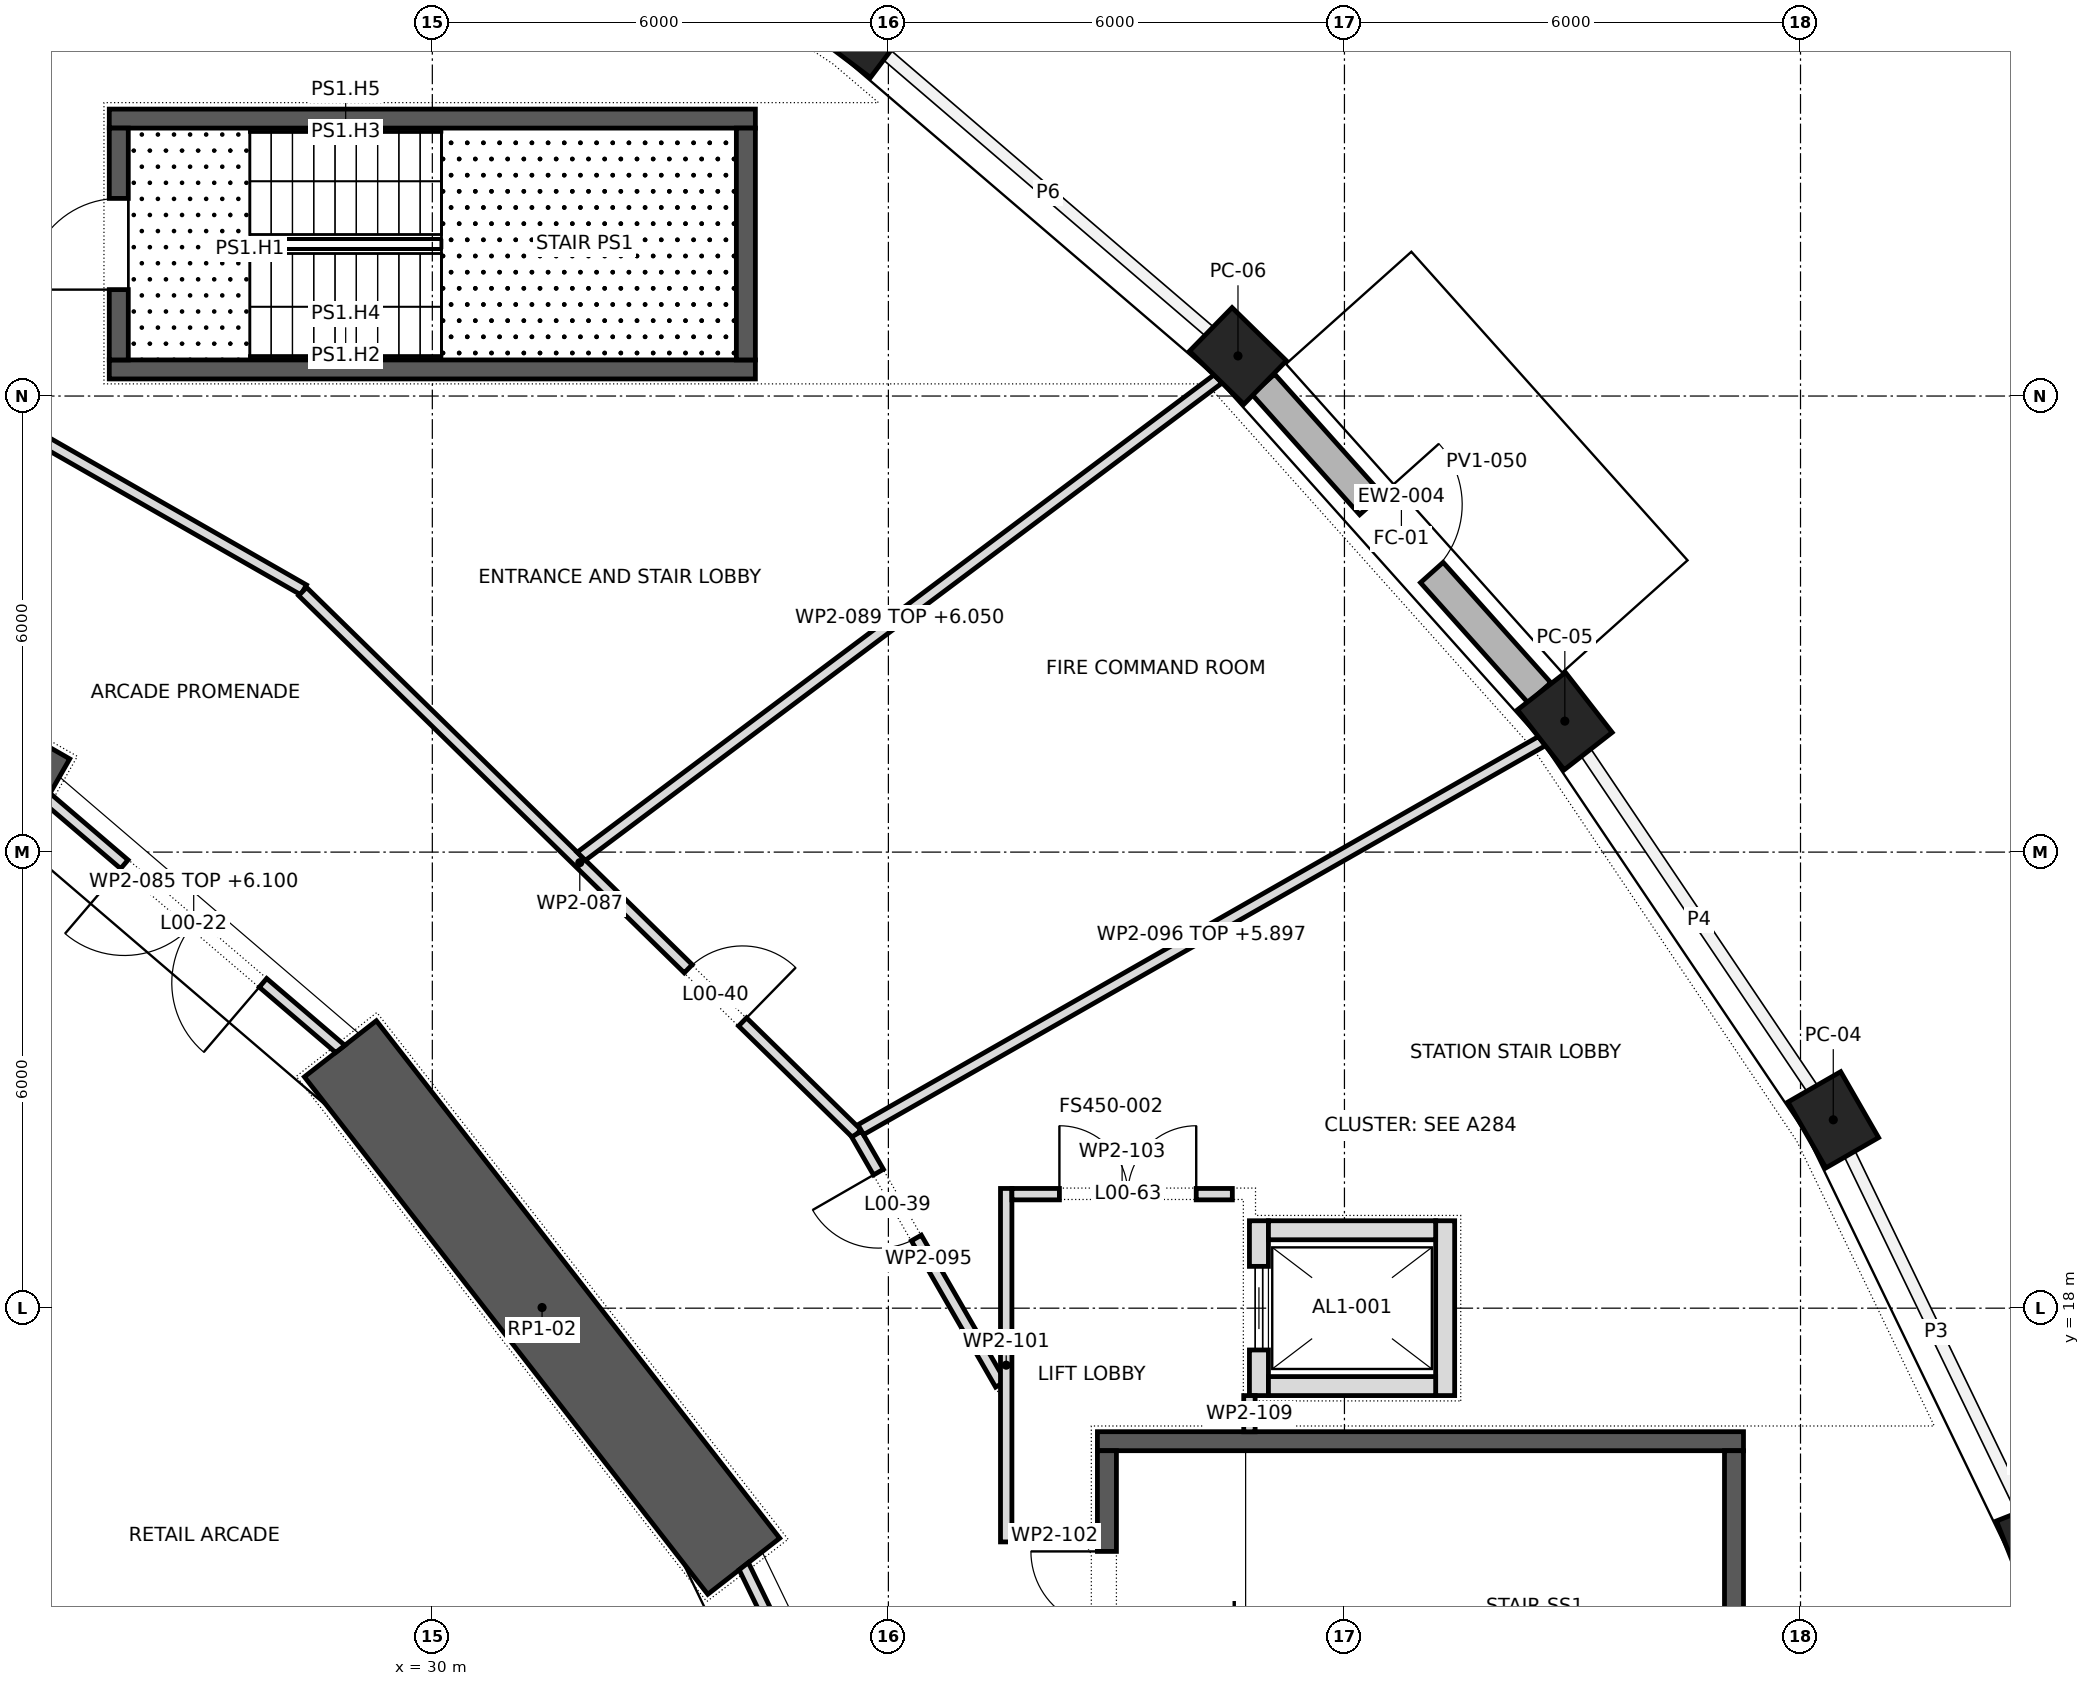
"""IFC4 building model, lengths in metres.
Left out: names, types, materials, properties, quantities, classifications, styles, units other than length and angle.
Written with IfcOpenShell. Run it as: python <this file> out.ifc"""

import sys

from ifc_helpers import new_model, si_unit, direction, frame, frame_2d, origin, origin_2d, place, context, subcontext, project, spatial, polyline, rectangle, outline, extrude, element, fill, save


model = new_model("IFC4")
c1 = context("Model", 3, precision=1e-05, world=origin(), true_north=direction((0.0, 1.0)))
c2 = subcontext(c1, "Body", "Model", "MODEL_VIEW")
j1 = project(units=[si_unit("LENGTHUNIT", "METRE"), si_unit("PLANEANGLEUNIT", "RADIAN")], contexts=[c1])
p1 = place(None, origin())
s1 = spatial("IfcSite", under=j1, at=p1, CompositionType="ELEMENT")
p2 = place(p1, origin())
s2 = spatial("IfcBuilding", under=s1, at=p2, CompositionType="ELEMENT")
p3 = place(p2, origin())
s3 = spatial("IfcBuildingStorey", under=s2, at=p3, CompositionType="ELEMENT", Elevation=0.0)
for number, where, z_axis, x_axis in (
    (1, (51.134, 14.883, 0.0), (0.0, 0.0, 1.0), (-0.368, 0.93, 0.0)),
    (2, (48.431, 20.478, 0.0), (0.0, 0.0, 1.0), (-0.499, 0.867, 0.0)),
    (3, (44.899, 25.723, 0.0), (0.0, 0.0, 1.0), (-0.615, 0.789, 0.0)),
    (4, (40.599, 30.528, 0.0), (0.0, 0.0, 1.0), (-0.715, 0.699, 0.0)),
    (5, (35.605, 34.81, 0.0), (0.0, 0.0, 1.0), (-0.799, 0.601, 0.0)),
):
    element("IfcColumn", number, at=place(p3, frame(where, z_axis=z_axis, x_axis=x_axis)), inside=s3, PredefinedType="COLUMN", context=c2, shape_type="SweptSolid", body=[
        extrude(rectangle(XDim=1.0, YDim=0.8, at=origin_2d()), origin(), (0.0, 0.0, 1.0), 7.0),
    ])
p4 = place(p3, frame((34.097, 14.605, 0.0), z_axis=(0.0, 0.0, 1.0), x_axis=(-0.614825322247, 0.788663314174, 0.0)))
e6 = element("IfcWall", 6, at=p4, inside=s3, PredefinedType="SHEAR", context=c2, shape_type="SweptSolid", body=[
    extrude(rectangle(XDim=8.632, YDim=1.2, at=frame_2d((4.316, 0.0))), origin(), (0.0, 0.0, 1.0), 7.0),
])
p5 = place(p3, frame((24.931, 24.706, 0.0), z_axis=(0.0, 0.0, 1.0), x_axis=(-0.867760656864, 0.496982336103, 0.0)))
e7 = element("IfcWall", 7, at=p5, inside=s3, PredefinedType="SHEAR", context=c2, shape_type="SweptSolid", body=[
    extrude(rectangle(XDim=9.038, YDim=1.2, at=frame_2d((4.519, 0.0))), origin(), (0.0, 0.0, 1.0), 7.0),
])
p6 = place(p3, frame((44.566, 26.095, 0.0), z_axis=(0.0, 0.0, 1.0), x_axis=(-0.666902265084, 0.745145199827, 0.0)))
e8 = element("IfcWall", 8, at=p6, inside=s3, PredefinedType="STANDARD", context=c2, shape_type="SweptSolid", body=[
    extrude(rectangle(XDim=5.448, YDim=0.4, at=frame_2d((2.724, 0.0))), origin(), (0.0, 0.0, 1.0), 6.2),
])
p7 = place(p6, frame((2.124, 0.0, 0.0)))
e9 = element("IfcOpeningElement", 9, at=p7, cuts=e8, PredefinedType="OPENING", context=c2, shape_type="SweptSolid", body=[
    extrude(rectangle(XDim=1.2, YDim=2.4, at=frame_2d((0.6, 1.2))), frame((0.0, 0.212, 0.0), z_axis=(0.0, -1.0, 0.0), x_axis=(1.0, 0.0, 0.0)), (0.0, 0.0, 1.0), 0.424),
])
p8 = place(p3, frame((38.75, 16.25, 0.0), z_axis=(0.0, 0.0, 1.0), x_axis=(1.0, 0.0, 0.0)))
e10 = element("IfcWall", 10, at=p8, inside=s3, PredefinedType="SHEAR", context=c2, shape_type="SweptSolid", body=[
    extrude(rectangle(XDim=8.5, YDim=0.25, at=frame_2d((4.25, 0.0))), origin(), (0.0, 0.0, 1.0), 6.65),
])
p9 = place(p3, frame((38.875, 11.875, 0.0), z_axis=(0.0, 0.0, 1.0), x_axis=(0.0, 1.0, 0.0)))
e11 = element("IfcWall", 11, at=p9, inside=s3, PredefinedType="SHEAR", context=c2, shape_type="SweptSolid", body=[
    extrude(rectangle(XDim=4.25, YDim=0.25, at=frame_2d((2.125, 0.0))), origin(), (0.0, 0.0, 1.0), 6.65),
])
p10 = place(p9, frame((0.925, 0.0, 0.0)))
e12 = element("IfcOpeningElement", 12, at=p10, cuts=e11, PredefinedType="OPENING", context=c2, shape_type="SweptSolid", body=[
    extrude(rectangle(XDim=2.0, YDim=2.1, at=frame_2d((1.0, 1.05))), frame((0.0, 0.137, 0.0), z_axis=(0.0, -1.0, 0.0), x_axis=(1.0, 0.0, 0.0)), (0.0, 0.0, 1.0), 0.274),
])
p11 = place(p3, frame((47.125, 11.875, 0.0), z_axis=(0.0, 0.0, 1.0), x_axis=(0.0, 1.0, 0.0)))
e13 = element("IfcWall", 13, at=p11, inside=s3, PredefinedType="SHEAR", context=c2, shape_type="SweptSolid", body=[
    extrude(rectangle(XDim=4.25, YDim=0.25, at=frame_2d((2.125, 0.0))), origin(), (0.0, 0.0, 1.0), 6.65),
])
for number, where, z_axis, x_axis in (
    (14, (25.75, 33.65, 0.0), (0.0, 0.0, 1.0), (1.0, 0.0, 0.0)),
    (15, (25.75, 30.35, 0.0), (0.0, 0.0, 1.0), (1.0, 0.0, 0.0)),
):
    element("IfcWall", number, at=place(p3, frame(where, z_axis=z_axis, x_axis=x_axis)), inside=s3, PredefinedType="SHEAR", context=c2, shape_type="SweptSolid", body=[
        extrude(rectangle(XDim=8.5, YDim=0.25, at=frame_2d((4.25, 0.0))), origin(), (0.0, 0.0, 1.0), 6.65),
    ])
p12 = place(p3, frame((25.875, 30.475, 0.0), z_axis=(0.0, 0.0, 1.0), x_axis=(0.0, 1.0, 0.0)))
e16 = element("IfcWall", 16, at=p12, inside=s3, PredefinedType="SHEAR", context=c2, shape_type="SweptSolid", body=[
    extrude(rectangle(XDim=3.05, YDim=0.25, at=frame_2d((1.525, 0.0))), origin(), (0.0, 0.0, 1.0), 6.65),
])
p13 = place(p12, frame((0.925, 0.0, 0.0)))
e17 = element("IfcOpeningElement", 17, at=p13, cuts=e16, PredefinedType="OPENING", context=c2, shape_type="SweptSolid", body=[
    extrude(rectangle(XDim=1.2, YDim=2.1, at=frame_2d((0.6, 1.05))), frame((0.0, 0.137, 0.0), z_axis=(0.0, -1.0, 0.0), x_axis=(1.0, 0.0, 0.0)), (0.0, 0.0, 1.0), 0.274),
])
p14 = place(p3, frame((34.125, 30.475, 0.0), z_axis=(0.0, 0.0, 1.0), x_axis=(0.0, 1.0, 0.0)))
e18 = element("IfcWall", 18, at=p14, inside=s3, PredefinedType="SHEAR", context=c2, shape_type="SweptSolid", body=[
    extrude(rectangle(XDim=3.05, YDim=0.25, at=frame_2d((1.525, 0.0))), origin(), (0.0, 0.0, 1.0), 6.65),
])
p15 = place(p3, frame((40.875, 16.85, 0.0), z_axis=(0.0, 0.0, 1.0), x_axis=(0.0, 1.0, 0.0)))
e19 = element("IfcWall", 19, at=p15, inside=s3, PredefinedType="PARTITIONING", context=c2, shape_type="SweptSolid", body=[
    extrude(rectangle(XDim=2.3, YDim=0.25, at=frame_2d((1.15, 0.0))), origin(), (0.0, 0.0, 1.0), 6.65),
])
p16 = place(p15, frame((0.6, 0.0, 0.0)))
e20 = element("IfcOpeningElement", 20, at=p16, cuts=e19, PredefinedType="OPENING", context=c2, shape_type="SweptSolid", body=[
    extrude(rectangle(XDim=1.1, YDim=2.1, at=frame_2d((0.55, 1.05))), frame((0.0, 0.137, 0.0), z_axis=(0.0, -1.0, 0.0), x_axis=(1.0, 0.0, 0.0)), (0.0, 0.0, 1.0), 0.274),
])
p17 = place(p3, frame((43.325, 16.85, 0.0), z_axis=(0.0, 0.0, 1.0), x_axis=(0.0, 1.0, 0.0)))
e21 = element("IfcWall", 21, at=p17, inside=s3, PredefinedType="PARTITIONING", context=c2, shape_type="SweptSolid", body=[
    extrude(rectangle(XDim=2.3, YDim=0.25, at=frame_2d((1.15, 0.0))), origin(), (0.0, 0.0, 1.0), 6.65),
])
for number, where, z_axis, x_axis in (
    (22, (41.0, 19.025, 0.0), (0.0, 0.0, 1.0), (1.0, 0.0, 0.0)),
    (23, (41.0, 16.975, 0.0), (0.0, 0.0, 1.0), (1.0, 0.0, 0.0)),
):
    element("IfcWall", number, at=place(p3, frame(where, z_axis=z_axis, x_axis=x_axis)), inside=s3, PredefinedType="PARTITIONING", context=c2, shape_type="SweptSolid", body=[
        extrude(rectangle(XDim=2.2, YDim=0.25, at=frame_2d((1.1, 0.0))), origin(), (0.0, 0.0, 1.0), 6.65),
    ])
p18 = place(p3, frame((18.958, 32.8, 0.0), z_axis=(0.0, 0.0, 1.0), x_axis=(0.867958465669, -0.496636790697, 0.0)))
e24 = element("IfcWall", 24, at=p18, inside=s3, PredefinedType="PARTITIONING", context=c2, shape_type="SweptSolid", body=[
    extrude(rectangle(XDim=10.772, YDim=0.15, at=frame_2d((5.386, 0.0))), origin(), (0.0, 0.0, 1.0), 6.65),
])
p19 = place(p18, frame((4.125, 0.0, 0.0)))
e25 = element("IfcOpeningElement", 25, at=p19, cuts=e24, PredefinedType="OPENING", context=c2, shape_type="SweptSolid", body=[
    extrude(rectangle(XDim=2.4, YDim=2.1, at=frame_2d((1.2, 1.05))), frame((0.0, 0.087, 0.0), z_axis=(0.0, -1.0, 0.0), x_axis=(1.0, 0.0, 0.0)), (0.0, 0.0, 1.0), 0.174),
])
p20 = place(p3, frame((24.932, 24.708, 0.0), z_axis=(0.0, 0.0, 1.0), x_axis=(0.760084552743, -0.649824185978, 0.0)))
e26 = element("IfcWall", 26, at=p20, inside=s3, PredefinedType="PARTITIONING", context=c2, shape_type="SweptSolid", body=[
    extrude(outline(polyline([(0.014, -0.075), (5.06, -0.075), (5.09, 0.075), (-0.014, 0.075), (0.014, -0.075)])), origin(), (0.0, 0.0, 1.0), 6.1),
])
p21 = place(p20, frame((1.337, 0.0, 0.0)))
e27 = element("IfcOpeningElement", 27, at=p21, cuts=e26, PredefinedType="OPENING", context=c2, shape_type="SweptSolid", body=[
    extrude(rectangle(XDim=2.4, YDim=2.1, at=frame_2d((1.2, 1.05))), frame((0.0, 0.087, 0.0), z_axis=(0.0, -1.0, 0.0), x_axis=(1.0, 0.0, 0.0)), (0.0, 0.0, 1.0), 0.174),
])
p22 = place(p3, frame((28.294, 27.428, 0.0), z_axis=(0.0, 0.0, 1.0), x_axis=(0.714841567175, -0.6992864462, 0.0)))
e28 = element("IfcWall", 28, at=p22, inside=s3, PredefinedType="PARTITIONING", context=c2, shape_type="SweptSolid", body=[
    extrude(rectangle(XDim=10.202, YDim=0.15, at=frame_2d((5.101, 0.0))), origin(), (0.0, 0.0, 1.0), 6.65),
])
p23 = place(p22, frame((7.097, 0.0, 0.0)))
e29 = element("IfcOpeningElement", 29, at=p23, cuts=e28, PredefinedType="OPENING", context=c2, shape_type="SweptSolid", body=[
    extrude(rectangle(XDim=1.0, YDim=2.1, at=frame_2d((0.5, 1.05))), frame((0.0, 0.087, 0.0), z_axis=(0.0, -1.0, 0.0), x_axis=(1.0, 0.0, 0.0)), (0.0, 0.0, 1.0), 0.174),
])
p24 = place(p3, frame((31.96, 23.945, 0.0), z_axis=(0.0, 0.0, 1.0), x_axis=(0.800117504973, 0.599843294732, 0.0)))
e30 = element("IfcWall", 30, at=p24, inside=s3, PredefinedType="PARTITIONING", context=c2, shape_type="SweptSolid", body=[
    extrude(outline(polyline([(0.011, -0.075), (10.482, -0.075), (10.459, 0.075), (-0.011, 0.075), (0.011, -0.075)])), origin(), (0.0, 0.0, 1.0), 6.05),
])
p25 = place(p3, frame((34.097, 14.606, 0.0), z_axis=(0.0, 0.0, 1.0), x_axis=(0.436936398764, -0.899492403212, 0.0)))
e31 = element("IfcWall", 31, at=p25, inside=s3, PredefinedType="PARTITIONING", context=c2, shape_type="SweptSolid", body=[
    extrude(outline(polyline([(0.016, -0.075), (4.681, -0.075), (4.715, 0.075), (-0.016, 0.075), (0.016, -0.075)])), origin(), (0.0, 0.0, 1.0), 6.1),
])
p26 = place(p25, frame((1.152, 0.0, 0.0)))
e32 = element("IfcOpeningElement", 32, at=p26, cuts=e31, PredefinedType="OPENING", context=c2, shape_type="SweptSolid", body=[
    extrude(rectangle(XDim=2.4, YDim=2.1, at=frame_2d((1.2, 1.05))), frame((0.0, 0.087, 0.0), z_axis=(0.0, -1.0, 0.0), x_axis=(1.0, 0.0, 0.0)), (0.0, 0.0, 1.0), 0.174),
])
p27 = place(p3, frame((35.582, 20.29, 0.0), z_axis=(0.0, 0.0, 1.0), x_axis=(0.498809328019, -0.866711748092, 0.0)))
e33 = element("IfcWall", 33, at=p27, inside=s3, PredefinedType="PARTITIONING", context=c2, shape_type="SweptSolid", body=[
    extrude(rectangle(XDim=3.797, YDim=0.15, at=frame_2d((1.898, 0.0))), origin(), (0.0, 0.0, 1.0), 6.65),
])
p28 = place(p27, frame((0.577, 0.0, 0.0)))
e34 = element("IfcOpeningElement", 34, at=p28, cuts=e33, PredefinedType="OPENING", context=c2, shape_type="SweptSolid", body=[
    extrude(rectangle(XDim=1.0, YDim=2.1, at=frame_2d((0.5, 1.05))), frame((0.0, 0.087, 0.0), z_axis=(0.0, -1.0, 0.0), x_axis=(1.0, 0.0, 0.0)), (0.0, 0.0, 1.0), 0.174),
])
p29 = place(p3, frame((35.637, 20.348, 0.0), z_axis=(0.0, 0.0, 1.0), x_axis=(0.868596802664, 0.495519519698, 0.0)))
e35 = element("IfcWall", 35, at=p29, inside=s3, PredefinedType="PARTITIONING", context=c2, shape_type="SweptSolid", body=[
    extrude(outline(polyline([(0.0, -0.075), (10.327, -0.075), (10.306, 0.075), (0.0, 0.075), (0.0, -0.075)])), origin(), (0.0, 0.0, 1.0), 5.897),
])
p30 = place(p3, frame((37.55, 14.925, 0.0), z_axis=(0.0, 0.0, 1.0), x_axis=(0.0, 1.0, 0.0)))
e36 = element("IfcWall", 36, at=p30, inside=s3, PredefinedType="PARTITIONING", context=c2, shape_type="SweptSolid", body=[
    extrude(rectangle(XDim=4.65, YDim=0.15, at=frame_2d((2.325, 0.0))), origin(), (0.0, 0.0, 1.0), 6.65),
])
p31 = place(p3, frame((37.625, 15.0, 0.0), z_axis=(0.0, 0.0, 1.0), x_axis=(1.0, 0.0, 0.0)))
e37 = element("IfcWall", 37, at=p31, inside=s3, PredefinedType="PARTITIONING", context=c2, shape_type="SweptSolid", body=[
    extrude(rectangle(XDim=1.126, YDim=0.15, at=frame_2d((0.563, 0.0))), origin(), (0.0, 0.0, 1.0), 6.65),
])
p32 = place(p3, frame((37.625, 19.5, 0.0), z_axis=(0.0, 0.0, 1.0), x_axis=(1.0, 0.0, 0.0)))
e38 = element("IfcWall", 38, at=p32, inside=s3, PredefinedType="PARTITIONING", context=c2, shape_type="SweptSolid", body=[
    extrude(rectangle(XDim=2.9, YDim=0.15, at=frame_2d((1.45, 0.0))), origin(), (0.0, 0.0, 1.0), 6.65),
])
p33 = place(p32, frame((0.625, 0.0, 0.0)))
e39 = element("IfcOpeningElement", 39, at=p33, cuts=e38, PredefinedType="OPENING", context=c2, shape_type="SweptSolid", body=[
    extrude(rectangle(XDim=1.8, YDim=2.1, at=frame_2d((0.9, 1.05))), frame((0.0, 0.087, 0.0), z_axis=(0.0, -1.0, 0.0), x_axis=(1.0, 0.0, 0.0)), (0.0, 0.0, 1.0), 0.174),
])
p34 = place(p3, frame((40.75, 16.85, 0.0), z_axis=(0.0, 0.0, 1.0), x_axis=(0.0, -1.0, 0.0)))
e40 = element("IfcWall", 40, at=p34, inside=s3, PredefinedType="PARTITIONING", context=c2, shape_type="SweptSolid", body=[
    extrude(rectangle(XDim=0.476, YDim=0.15, at=frame_2d((0.238, 0.0))), origin(), (0.0, 0.0, 1.0), 6.65),
])
p35 = place(p7, frame((1.2, 0.0, 0.0), z_axis=(0.0, 0.0, 1.0), x_axis=(-1.0, 0.0, 0.0)))
e41 = element("IfcDoor", 41, at=p35, inside=s3, OperationType="SINGLE_SWING_RIGHT", PredefinedType="DOOR", context=c2, shape_type="SweptSolid", body=[
    extrude(rectangle(XDim=1.2, YDim=2.4, at=frame_2d((0.6, 1.2))), frame((0.0, 0.025, 0.0), z_axis=(0.0, -1.0, 0.0), x_axis=(1.0, 0.0, 0.0)), (0.0, 0.0, 1.0), 0.05),
])
fill(e9, e41)
p36 = place(p16, origin())
e42 = element("IfcDoor", 42, at=p36, inside=s3, OperationType="SLIDING_TO_LEFT", PredefinedType="DOOR", context=c2, shape_type="SweptSolid", body=[
    extrude(rectangle(XDim=1.1, YDim=2.1, at=frame_2d((0.55, 1.05))), frame((0.0, 0.025, 0.0), z_axis=(0.0, -1.0, 0.0), x_axis=(1.0, 0.0, 0.0)), (0.0, 0.0, 1.0), 0.05),
])
fill(e20, e42)
p37 = place(p10, origin())
e43 = element("IfcDoor", 43, at=p37, inside=s3, OperationType="DOUBLE_DOOR_SINGLE_SWING", PredefinedType="DOOR", context=c2, shape_type="SweptSolid", body=[
    extrude(rectangle(XDim=2.0, YDim=2.1, at=frame_2d((1.0, 1.05))), frame((0.0, 0.025, 0.0), z_axis=(0.0, -1.0, 0.0), x_axis=(1.0, 0.0, 0.0)), (0.0, 0.0, 1.0), 0.05),
])
fill(e12, e43)
p38 = place(p13, origin())
e44 = element("IfcDoor", 44, at=p38, inside=s3, OperationType="SINGLE_SWING_RIGHT", PredefinedType="DOOR", context=c2, shape_type="SweptSolid", body=[
    extrude(rectangle(XDim=1.2, YDim=2.1, at=frame_2d((0.6, 1.05))), frame((0.0, 0.025, 0.0), z_axis=(0.0, -1.0, 0.0), x_axis=(1.0, 0.0, 0.0)), (0.0, 0.0, 1.0), 0.05),
])
fill(e17, e44)
p39 = place(p21, frame((2.4, 0.0, 0.0), z_axis=(0.0, 0.0, 1.0), x_axis=(-1.0, 0.0, 0.0)))
e45 = element("IfcDoor", 45, at=p39, inside=s3, OperationType="DOUBLE_DOOR_SINGLE_SWING", PredefinedType="DOOR", context=c2, shape_type="SweptSolid", body=[
    extrude(rectangle(XDim=2.4, YDim=2.1, at=frame_2d((1.2, 1.05))), frame((0.0, 0.025, 0.0), z_axis=(0.0, -1.0, 0.0), x_axis=(1.0, 0.0, 0.0)), (0.0, 0.0, 1.0), 0.05),
])
fill(e27, e45)
p40 = place(p28, frame((1.0, 0.0, 0.0), z_axis=(0.0, 0.0, 1.0), x_axis=(-1.0, 0.0, 0.0)))
e46 = element("IfcDoor", 46, at=p40, inside=s3, OperationType="SINGLE_SWING_LEFT", PredefinedType="DOOR", context=c2, shape_type="SweptSolid", body=[
    extrude(rectangle(XDim=1.0, YDim=2.1, at=frame_2d((0.5, 1.05))), frame((0.0, 0.025, 0.0), z_axis=(0.0, -1.0, 0.0), x_axis=(1.0, 0.0, 0.0)), (0.0, 0.0, 1.0), 0.05),
])
fill(e34, e46)
p41 = place(p23, origin())
e47 = element("IfcDoor", 47, at=p41, inside=s3, OperationType="SINGLE_SWING_LEFT", PredefinedType="DOOR", context=c2, shape_type="SweptSolid", body=[
    extrude(rectangle(XDim=1.0, YDim=2.1, at=frame_2d((0.5, 1.05))), frame((0.0, 0.025, 0.0), z_axis=(0.0, -1.0, 0.0), x_axis=(1.0, 0.0, 0.0)), (0.0, 0.0, 1.0), 0.05),
])
fill(e29, e47)
p42 = place(p33, origin())
e48 = element("IfcDoor", 48, at=p42, inside=s3, OperationType="DOUBLE_DOOR_SINGLE_SWING", PredefinedType="DOOR", context=c2, shape_type="SweptSolid", body=[
    extrude(rectangle(XDim=1.8, YDim=2.1, at=frame_2d((0.9, 1.05))), frame((0.0, 0.025, 0.0), z_axis=(0.0, -1.0, 0.0), x_axis=(1.0, 0.0, 0.0)), (0.0, 0.0, 1.0), 0.05),
])
fill(e39, e48)
save(model, sys.argv[1])
